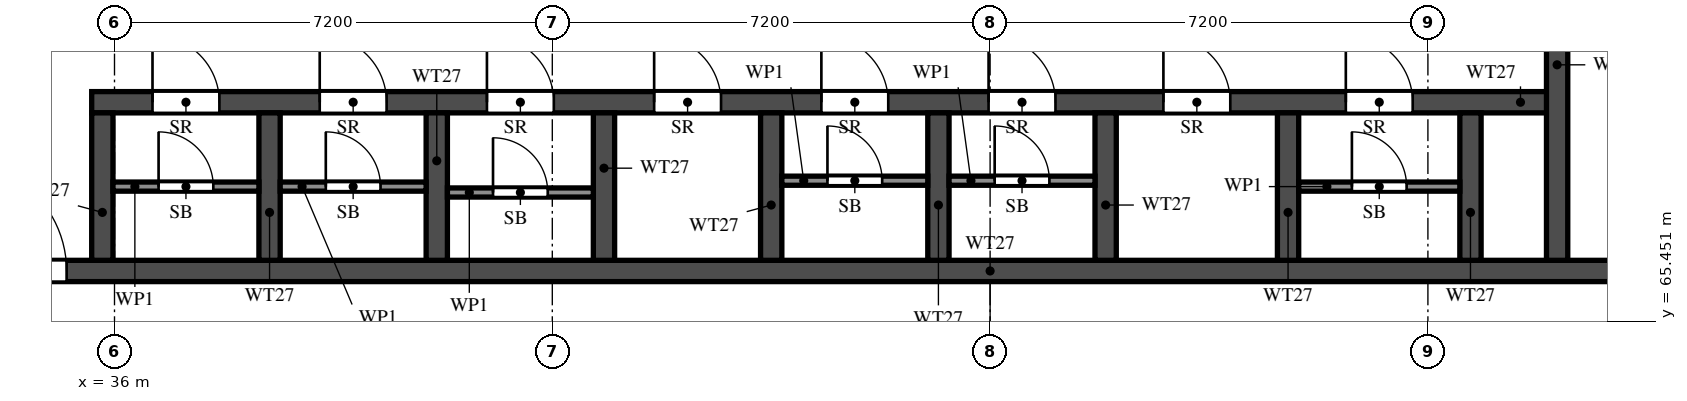
"""IFC4 building model, lengths in metres.
Left out: names, types, materials, properties, quantities, classifications, styles, units other than length and angle.
Written with IfcOpenShell. Run it as: python <this file> out.ifc"""

import sys

from ifc_helpers import new_model, si_unit, direction, frame, frame_2d, origin, place, context, subcontext, project, spatial, rectangle, extrude, element, fill, save


model = new_model("IFC4")
c1 = context("Model", 3, precision=1e-05, world=origin(), true_north=direction((0.0, 1.0)))
c2 = subcontext(c1, "Body", "Model", "MODEL_VIEW")
j1 = project(units=[si_unit("LENGTHUNIT", "METRE"), si_unit("PLANEANGLEUNIT", "RADIAN")], contexts=[c1])
p1 = place(None, origin())
s1 = spatial("IfcSite", under=j1, at=p1, CompositionType="ELEMENT")
p2 = place(p1, origin())
s2 = spatial("IfcBuilding", under=s1, at=p2, CompositionType="ELEMENT")
p3 = place(p2, frame((0.0, 0.0, 195.5)))
s3 = spatial("IfcBuildingStorey", under=s2, at=p3, CompositionType="ELEMENT", Elevation=195.5)
p4 = place(p3, frame((29.7, 66.275, 0.0), z_axis=(0.0, 0.0, 1.0), x_axis=(1.0, 0.0, 0.0)))
e1 = element("IfcWall", 1, at=p4, inside=s3, PredefinedType="SHEAR", context=c2, shape_type="SweptSolid", body=[
    extrude(rectangle(XDim=41.4, YDim=0.35, at=frame_2d((20.7, 0.0))), origin(), (0.0, 0.0, 1.0), 3.2),
])
p5 = place(p4, frame((0.925, 0.0, 0.0)))
e2 = element("IfcOpeningElement", 2, at=p5, cuts=e1, PredefinedType="OPENING", context=c2, shape_type="SweptSolid", body=[
    extrude(rectangle(XDim=1.1, YDim=2.1, at=frame_2d((0.55, 1.05))), frame((0.0, 0.185, 0.0), z_axis=(0.0, -1.0, 0.0), x_axis=(1.0, 0.0, 0.0)), (0.0, 0.0, 1.0), 0.37),
])
p6 = place(p4, frame((3.712, 0.0, 0.0)))
e3 = element("IfcOpeningElement", 3, at=p6, cuts=e1, PredefinedType="OPENING", context=c2, shape_type="SweptSolid", body=[
    extrude(rectangle(XDim=1.8, YDim=2.1, at=frame_2d((0.9, 1.05))), frame((0.0, 0.185, 0.0), z_axis=(0.0, -1.0, 0.0), x_axis=(1.0, 0.0, 0.0)), (0.0, 0.0, 1.0), 0.37),
])
p7 = place(p3, frame((35.625, 69.05, 0.0), z_axis=(0.0, 0.0, 1.0), x_axis=(1.0, 0.0, 0.0)))
e4 = element("IfcWall", 4, at=p7, inside=s3, PredefinedType="SHEAR", context=c2, shape_type="SweptSolid", body=[
    extrude(rectangle(XDim=24.1, YDim=0.35, at=frame_2d((12.05, 0.0))), origin(), (0.0, 0.0, 1.0), 3.2),
])
p8 = place(p7, frame((1.0, 0.0, 0.0)))
e5 = element("IfcOpeningElement", 5, at=p8, cuts=e4, PredefinedType="OPENING", context=c2, shape_type="SweptSolid", body=[
    extrude(rectangle(XDim=1.1, YDim=2.1, at=frame_2d((0.55, 1.05))), frame((0.0, 0.185, 0.0), z_axis=(0.0, -1.0, 0.0), x_axis=(1.0, 0.0, 0.0)), (0.0, 0.0, 1.0), 0.37),
])
p9 = place(p7, frame((3.75, 0.0, 0.0)))
e6 = element("IfcOpeningElement", 6, at=p9, cuts=e4, PredefinedType="OPENING", context=c2, shape_type="SweptSolid", body=[
    extrude(rectangle(XDim=1.1, YDim=2.1, at=frame_2d((0.55, 1.05))), frame((0.0, 0.185, 0.0), z_axis=(0.0, -1.0, 0.0), x_axis=(1.0, 0.0, 0.0)), (0.0, 0.0, 1.0), 0.37),
])
p10 = place(p7, frame((6.5, 0.0, 0.0)))
e7 = element("IfcOpeningElement", 7, at=p10, cuts=e4, PredefinedType="OPENING", context=c2, shape_type="SweptSolid", body=[
    extrude(rectangle(XDim=1.1, YDim=2.1, at=frame_2d((0.55, 1.05))), frame((0.0, 0.185, 0.0), z_axis=(0.0, -1.0, 0.0), x_axis=(1.0, 0.0, 0.0)), (0.0, 0.0, 1.0), 0.37),
])
p11 = place(p7, frame((9.25, 0.0, 0.0)))
e8 = element("IfcOpeningElement", 8, at=p11, cuts=e4, PredefinedType="OPENING", context=c2, shape_type="SweptSolid", body=[
    extrude(rectangle(XDim=1.1, YDim=2.1, at=frame_2d((0.55, 1.05))), frame((0.0, 0.185, 0.0), z_axis=(0.0, -1.0, 0.0), x_axis=(1.0, 0.0, 0.0)), (0.0, 0.0, 1.0), 0.37),
])
p12 = place(p7, frame((12.0, 0.0, 0.0)))
e9 = element("IfcOpeningElement", 9, at=p12, cuts=e4, PredefinedType="OPENING", context=c2, shape_type="SweptSolid", body=[
    extrude(rectangle(XDim=1.1, YDim=2.1, at=frame_2d((0.55, 1.05))), frame((0.0, 0.185, 0.0), z_axis=(0.0, -1.0, 0.0), x_axis=(1.0, 0.0, 0.0)), (0.0, 0.0, 1.0), 0.37),
])
p13 = place(p7, frame((14.75, 0.0, 0.0)))
e10 = element("IfcOpeningElement", 10, at=p13, cuts=e4, PredefinedType="OPENING", context=c2, shape_type="SweptSolid", body=[
    extrude(rectangle(XDim=1.1, YDim=2.1, at=frame_2d((0.55, 1.05))), frame((0.0, 0.185, 0.0), z_axis=(0.0, -1.0, 0.0), x_axis=(1.0, 0.0, 0.0)), (0.0, 0.0, 1.0), 0.37),
])
p14 = place(p7, frame((17.625, 0.0, 0.0)))
e11 = element("IfcOpeningElement", 11, at=p14, cuts=e4, PredefinedType="OPENING", context=c2, shape_type="SweptSolid", body=[
    extrude(rectangle(XDim=1.1, YDim=2.1, at=frame_2d((0.55, 1.05))), frame((0.0, 0.185, 0.0), z_axis=(0.0, -1.0, 0.0), x_axis=(1.0, 0.0, 0.0)), (0.0, 0.0, 1.0), 0.37),
])
p15 = place(p7, frame((20.625, 0.0, 0.0)))
e12 = element("IfcOpeningElement", 12, at=p15, cuts=e4, PredefinedType="OPENING", context=c2, shape_type="SweptSolid", body=[
    extrude(rectangle(XDim=1.1, YDim=2.1, at=frame_2d((0.55, 1.05))), frame((0.0, 0.185, 0.0), z_axis=(0.0, -1.0, 0.0), x_axis=(1.0, 0.0, 0.0)), (0.0, 0.0, 1.0), 0.37),
])
p16 = place(p3, frame((59.725, 66.45, 0.0), z_axis=(0.0, 0.0, 1.0), x_axis=(0.0, 1.0, 0.0)))
e13 = element("IfcWall", 13, at=p16, inside=s3, PredefinedType="SHEAR", context=c2, shape_type="SweptSolid", body=[
    extrude(rectangle(XDim=6.125, YDim=0.35, at=frame_2d((3.062, 0.0))), origin(), (0.0, 0.0, 1.0), 3.2),
])
p17 = place(p16, frame((3.85, 0.0, 0.0)))
e14 = element("IfcOpeningElement", 14, at=p17, cuts=e13, PredefinedType="OPENING", context=c2, shape_type="SweptSolid", body=[
    extrude(rectangle(XDim=1.2, YDim=2.1, at=frame_2d((0.6, 1.05))), frame((0.0, 0.185, 0.0), z_axis=(0.0, -1.0, 0.0), x_axis=(1.0, 0.0, 0.0)), (0.0, 0.0, 1.0), 0.37),
])
for number, where, z_axis, x_axis in (
    (15, (35.8, 66.45, 0.0), (0.0, 0.0, 1.0), (0.0, 1.0, 0.0)),
    (16, (38.55, 66.45, 0.0), (0.0, 0.0, 1.0), (0.0, 1.0, 0.0)),
    (17, (41.3, 66.45, 0.0), (0.0, 0.0, 1.0), (0.0, 1.0, 0.0)),
    (18, (44.05, 66.45, 0.0), (0.0, 0.0, 1.0), (0.0, 1.0, 0.0)),
    (19, (46.8, 66.45, 0.0), (0.0, 0.0, 1.0), (0.0, 1.0, 0.0)),
    (20, (49.55, 66.45, 0.0), (0.0, 0.0, 1.0), (0.0, 1.0, 0.0)),
    (21, (52.3, 66.45, 0.0), (0.0, 0.0, 1.0), (0.0, 1.0, 0.0)),
    (22, (55.3, 66.45, 0.0), (0.0, 0.0, 1.0), (0.0, 1.0, 0.0)),
    (23, (58.3, 66.45, 0.0), (0.0, 0.0, 1.0), (0.0, 1.0, 0.0)),
):
    element("IfcWall", number, at=place(p3, frame(where, z_axis=z_axis, x_axis=x_axis)), inside=s3, PredefinedType="SHEAR", context=c2, shape_type="SweptSolid", body=[
        extrude(rectangle(XDim=2.425, YDim=0.35, at=frame_2d((1.212, 0.0))), origin(), (0.0, 0.0, 1.0), 3.2),
    ])
p18 = place(p3, frame((35.975, 67.663, 0.0), z_axis=(0.0, 0.0, 1.0), x_axis=(1.0, 0.0, 0.0)))
e24 = element("IfcWall", 24, at=p18, inside=s3, PredefinedType="PARTITIONING", context=c2, shape_type="SweptSolid", body=[
    extrude(rectangle(XDim=2.4, YDim=0.15, at=frame_2d((1.2, 0.0))), origin(), (0.0, 0.0, 1.0), 3.2),
])
p19 = place(p18, frame((0.75, 0.0, 0.0)))
e25 = element("IfcOpeningElement", 25, at=p19, cuts=e24, PredefinedType="OPENING", context=c2, shape_type="SweptSolid", body=[
    extrude(rectangle(XDim=0.9, YDim=2.1, at=frame_2d((0.45, 1.05))), frame((0.0, 0.085, 0.0), z_axis=(0.0, -1.0, 0.0), x_axis=(1.0, 0.0, 0.0)), (0.0, 0.0, 1.0), 0.17),
])
p20 = place(p3, frame((38.725, 67.663, 0.0), z_axis=(0.0, 0.0, 1.0), x_axis=(1.0, 0.0, 0.0)))
e26 = element("IfcWall", 26, at=p20, inside=s3, PredefinedType="PARTITIONING", context=c2, shape_type="SweptSolid", body=[
    extrude(rectangle(XDim=2.4, YDim=0.15, at=frame_2d((1.2, 0.0))), origin(), (0.0, 0.0, 1.0), 3.2),
])
p21 = place(p20, frame((0.75, 0.0, 0.0)))
e27 = element("IfcOpeningElement", 27, at=p21, cuts=e26, PredefinedType="OPENING", context=c2, shape_type="SweptSolid", body=[
    extrude(rectangle(XDim=0.9, YDim=2.1, at=frame_2d((0.45, 1.05))), frame((0.0, 0.085, 0.0), z_axis=(0.0, -1.0, 0.0), x_axis=(1.0, 0.0, 0.0)), (0.0, 0.0, 1.0), 0.17),
])
p22 = place(p3, frame((41.475, 67.565, 0.0), z_axis=(0.0, 0.0, 1.0), x_axis=(1.0, 0.0, 0.0)))
e28 = element("IfcWall", 28, at=p22, inside=s3, PredefinedType="PARTITIONING", context=c2, shape_type="SweptSolid", body=[
    extrude(rectangle(XDim=2.4, YDim=0.15, at=frame_2d((1.2, 0.0))), origin(), (0.0, 0.0, 1.0), 3.2),
])
p23 = place(p22, frame((0.75, 0.0, 0.0)))
e29 = element("IfcOpeningElement", 29, at=p23, cuts=e28, PredefinedType="OPENING", context=c2, shape_type="SweptSolid", body=[
    extrude(rectangle(XDim=0.9, YDim=2.1, at=frame_2d((0.45, 1.05))), frame((0.0, 0.085, 0.0), z_axis=(0.0, -1.0, 0.0), x_axis=(1.0, 0.0, 0.0)), (0.0, 0.0, 1.0), 0.17),
])
p24 = place(p3, frame((46.975, 67.76, 0.0), z_axis=(0.0, 0.0, 1.0), x_axis=(1.0, 0.0, 0.0)))
e30 = element("IfcWall", 30, at=p24, inside=s3, PredefinedType="PARTITIONING", context=c2, shape_type="SweptSolid", body=[
    extrude(rectangle(XDim=2.4, YDim=0.15, at=frame_2d((1.2, 0.0))), origin(), (0.0, 0.0, 1.0), 3.2),
])
p25 = place(p24, frame((0.75, 0.0, 0.0)))
e31 = element("IfcOpeningElement", 31, at=p25, cuts=e30, PredefinedType="OPENING", context=c2, shape_type="SweptSolid", body=[
    extrude(rectangle(XDim=0.9, YDim=2.1, at=frame_2d((0.45, 1.05))), frame((0.0, 0.085, 0.0), z_axis=(0.0, -1.0, 0.0), x_axis=(1.0, 0.0, 0.0)), (0.0, 0.0, 1.0), 0.17),
])
p26 = place(p3, frame((49.725, 67.76, 0.0), z_axis=(0.0, 0.0, 1.0), x_axis=(1.0, 0.0, 0.0)))
e32 = element("IfcWall", 32, at=p26, inside=s3, PredefinedType="PARTITIONING", context=c2, shape_type="SweptSolid", body=[
    extrude(rectangle(XDim=2.4, YDim=0.15, at=frame_2d((1.2, 0.0))), origin(), (0.0, 0.0, 1.0), 3.2),
])
p27 = place(p26, frame((0.75, 0.0, 0.0)))
e33 = element("IfcOpeningElement", 33, at=p27, cuts=e32, PredefinedType="OPENING", context=c2, shape_type="SweptSolid", body=[
    extrude(rectangle(XDim=0.9, YDim=2.1, at=frame_2d((0.45, 1.05))), frame((0.0, 0.085, 0.0), z_axis=(0.0, -1.0, 0.0), x_axis=(1.0, 0.0, 0.0)), (0.0, 0.0, 1.0), 0.17),
])
p28 = place(p3, frame((55.475, 67.663, 0.0), z_axis=(0.0, 0.0, 1.0), x_axis=(1.0, 0.0, 0.0)))
e34 = element("IfcWall", 34, at=p28, inside=s3, PredefinedType="PARTITIONING", context=c2, shape_type="SweptSolid", body=[
    extrude(rectangle(XDim=2.65, YDim=0.15, at=frame_2d((1.325, 0.0))), origin(), (0.0, 0.0, 1.0), 3.2),
])
p29 = place(p28, frame((0.875, 0.0, 0.0)))
e35 = element("IfcOpeningElement", 35, at=p29, cuts=e34, PredefinedType="OPENING", context=c2, shape_type="SweptSolid", body=[
    extrude(rectangle(XDim=0.9, YDim=2.1, at=frame_2d((0.45, 1.05))), frame((0.0, 0.085, 0.0), z_axis=(0.0, -1.0, 0.0), x_axis=(1.0, 0.0, 0.0)), (0.0, 0.0, 1.0), 0.17),
])
p30 = place(p6, origin())
e36 = element("IfcDoor", 36, at=p30, inside=s3, OperationType="DOUBLE_DOOR_SINGLE_SWING", PredefinedType="DOOR", context=c2, shape_type="SweptSolid", body=[
    extrude(rectangle(XDim=1.8, YDim=2.1, at=frame_2d((0.9, 1.05))), frame((0.0, 0.025, 0.0), z_axis=(0.0, -1.0, 0.0), x_axis=(1.0, 0.0, 0.0)), (0.0, 0.0, 1.0), 0.05),
])
fill(e3, e36)
p31 = place(p8, origin())
e37 = element("IfcDoor", 37, at=p31, inside=s3, OperationType="SINGLE_SWING_RIGHT", PredefinedType="DOOR", context=c2, shape_type="SweptSolid", body=[
    extrude(rectangle(XDim=1.1, YDim=2.1, at=frame_2d((0.55, 1.05))), frame((0.0, 0.025, 0.0), z_axis=(0.0, -1.0, 0.0), x_axis=(1.0, 0.0, 0.0)), (0.0, 0.0, 1.0), 0.05),
])
fill(e5, e37)
p32 = place(p19, origin())
e38 = element("IfcDoor", 38, at=p32, inside=s3, OperationType="SINGLE_SWING_RIGHT", PredefinedType="DOOR", context=c2, shape_type="SweptSolid", body=[
    extrude(rectangle(XDim=0.9, YDim=2.1, at=frame_2d((0.45, 1.05))), frame((0.0, 0.025, 0.0), z_axis=(0.0, -1.0, 0.0), x_axis=(1.0, 0.0, 0.0)), (0.0, 0.0, 1.0), 0.05),
])
fill(e25, e38)
p33 = place(p9, origin())
e39 = element("IfcDoor", 39, at=p33, inside=s3, OperationType="SINGLE_SWING_LEFT", PredefinedType="DOOR", context=c2, shape_type="SweptSolid", body=[
    extrude(rectangle(XDim=1.1, YDim=2.1, at=frame_2d((0.55, 1.05))), frame((0.0, 0.025, 0.0), z_axis=(0.0, -1.0, 0.0), x_axis=(1.0, 0.0, 0.0)), (0.0, 0.0, 1.0), 0.05),
])
fill(e6, e39)
p34 = place(p21, origin())
e40 = element("IfcDoor", 40, at=p34, inside=s3, OperationType="SINGLE_SWING_LEFT", PredefinedType="DOOR", context=c2, shape_type="SweptSolid", body=[
    extrude(rectangle(XDim=0.9, YDim=2.1, at=frame_2d((0.45, 1.05))), frame((0.0, 0.025, 0.0), z_axis=(0.0, -1.0, 0.0), x_axis=(1.0, 0.0, 0.0)), (0.0, 0.0, 1.0), 0.05),
])
fill(e27, e40)
p35 = place(p10, origin())
e41 = element("IfcDoor", 41, at=p35, inside=s3, OperationType="SINGLE_SWING_RIGHT", PredefinedType="DOOR", context=c2, shape_type="SweptSolid", body=[
    extrude(rectangle(XDim=1.1, YDim=2.1, at=frame_2d((0.55, 1.05))), frame((0.0, 0.025, 0.0), z_axis=(0.0, -1.0, 0.0), x_axis=(1.0, 0.0, 0.0)), (0.0, 0.0, 1.0), 0.05),
])
fill(e7, e41)
p36 = place(p23, origin())
e42 = element("IfcDoor", 42, at=p36, inside=s3, OperationType="SINGLE_SWING_RIGHT", PredefinedType="DOOR", context=c2, shape_type="SweptSolid", body=[
    extrude(rectangle(XDim=0.9, YDim=2.1, at=frame_2d((0.45, 1.05))), frame((0.0, 0.025, 0.0), z_axis=(0.0, -1.0, 0.0), x_axis=(1.0, 0.0, 0.0)), (0.0, 0.0, 1.0), 0.05),
])
fill(e29, e42)
p37 = place(p11, origin())
e43 = element("IfcDoor", 43, at=p37, inside=s3, OperationType="SINGLE_SWING_LEFT", PredefinedType="DOOR", context=c2, shape_type="SweptSolid", body=[
    extrude(rectangle(XDim=1.1, YDim=2.1, at=frame_2d((0.55, 1.05))), frame((0.0, 0.025, 0.0), z_axis=(0.0, -1.0, 0.0), x_axis=(1.0, 0.0, 0.0)), (0.0, 0.0, 1.0), 0.05),
])
fill(e8, e43)
p38 = place(p12, origin())
e44 = element("IfcDoor", 44, at=p38, inside=s3, OperationType="SINGLE_SWING_RIGHT", PredefinedType="DOOR", context=c2, shape_type="SweptSolid", body=[
    extrude(rectangle(XDim=1.1, YDim=2.1, at=frame_2d((0.55, 1.05))), frame((0.0, 0.025, 0.0), z_axis=(0.0, -1.0, 0.0), x_axis=(1.0, 0.0, 0.0)), (0.0, 0.0, 1.0), 0.05),
])
fill(e9, e44)
p39 = place(p25, origin())
e45 = element("IfcDoor", 45, at=p39, inside=s3, OperationType="SINGLE_SWING_LEFT", PredefinedType="DOOR", context=c2, shape_type="SweptSolid", body=[
    extrude(rectangle(XDim=0.9, YDim=2.1, at=frame_2d((0.45, 1.05))), frame((0.0, 0.025, 0.0), z_axis=(0.0, -1.0, 0.0), x_axis=(1.0, 0.0, 0.0)), (0.0, 0.0, 1.0), 0.05),
])
fill(e31, e45)
p40 = place(p13, origin())
e46 = element("IfcDoor", 46, at=p40, inside=s3, OperationType="SINGLE_SWING_LEFT", PredefinedType="DOOR", context=c2, shape_type="SweptSolid", body=[
    extrude(rectangle(XDim=1.1, YDim=2.1, at=frame_2d((0.55, 1.05))), frame((0.0, 0.025, 0.0), z_axis=(0.0, -1.0, 0.0), x_axis=(1.0, 0.0, 0.0)), (0.0, 0.0, 1.0), 0.05),
])
fill(e10, e46)
p41 = place(p27, origin())
e47 = element("IfcDoor", 47, at=p41, inside=s3, OperationType="SINGLE_SWING_RIGHT", PredefinedType="DOOR", context=c2, shape_type="SweptSolid", body=[
    extrude(rectangle(XDim=0.9, YDim=2.1, at=frame_2d((0.45, 1.05))), frame((0.0, 0.025, 0.0), z_axis=(0.0, -1.0, 0.0), x_axis=(1.0, 0.0, 0.0)), (0.0, 0.0, 1.0), 0.05),
])
fill(e33, e47)
p42 = place(p14, origin())
e48 = element("IfcDoor", 48, at=p42, inside=s3, OperationType="SINGLE_SWING_RIGHT", PredefinedType="DOOR", context=c2, shape_type="SweptSolid", body=[
    extrude(rectangle(XDim=1.1, YDim=2.1, at=frame_2d((0.55, 1.05))), frame((0.0, 0.025, 0.0), z_axis=(0.0, -1.0, 0.0), x_axis=(1.0, 0.0, 0.0)), (0.0, 0.0, 1.0), 0.05),
])
fill(e11, e48)
p43 = place(p15, origin())
e49 = element("IfcDoor", 49, at=p43, inside=s3, OperationType="SINGLE_SWING_RIGHT", PredefinedType="DOOR", context=c2, shape_type="SweptSolid", body=[
    extrude(rectangle(XDim=1.1, YDim=2.1, at=frame_2d((0.55, 1.05))), frame((0.0, 0.025, 0.0), z_axis=(0.0, -1.0, 0.0), x_axis=(1.0, 0.0, 0.0)), (0.0, 0.0, 1.0), 0.05),
])
fill(e12, e49)
p44 = place(p29, origin())
e50 = element("IfcDoor", 50, at=p44, inside=s3, OperationType="SINGLE_SWING_LEFT", PredefinedType="DOOR", context=c2, shape_type="SweptSolid", body=[
    extrude(rectangle(XDim=0.9, YDim=2.1, at=frame_2d((0.45, 1.05))), frame((0.0, 0.025, 0.0), z_axis=(0.0, -1.0, 0.0), x_axis=(1.0, 0.0, 0.0)), (0.0, 0.0, 1.0), 0.05),
])
fill(e35, e50)
save(model, sys.argv[1])
